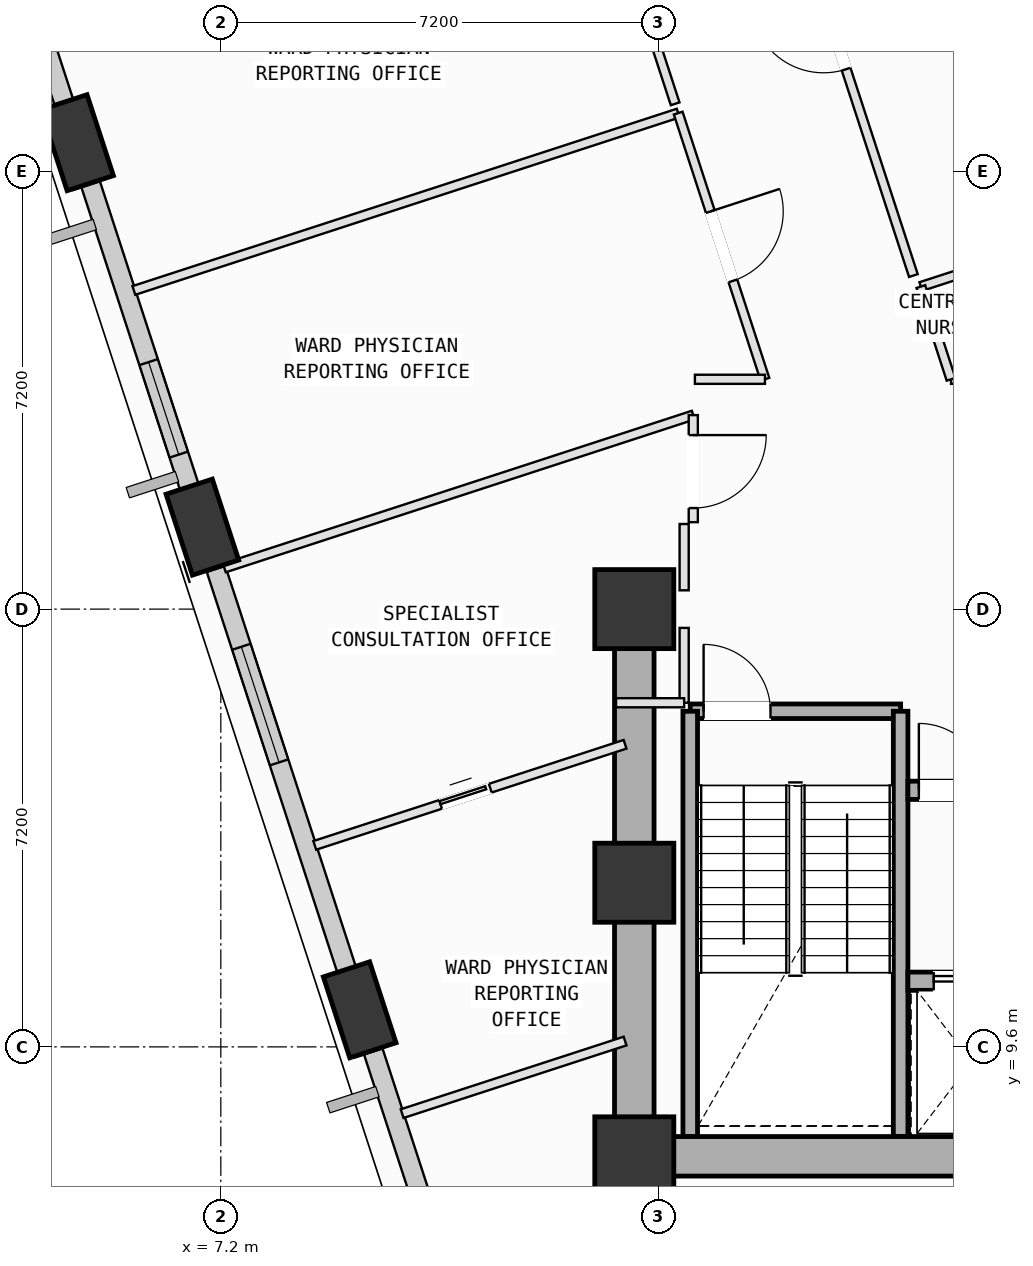
"""IFC4 building model, lengths in metres.
Left out: names, types, materials, properties, quantities, classifications, styles, units other than length and angle.
Written with IfcOpenShell. Run it as: python <this file> out.ifc"""

import sys

from ifc_helpers import new_model, si_unit, direction, frame, frame_2d, origin, origin_2d, place, context, subcontext, project, spatial, rectangle, extrude, element, fill, save


model = new_model("IFC4")
c1 = context("Model", 3, precision=1e-05, world=origin(), true_north=direction((0.0, 1.0)))
c2 = subcontext(c1, "Body", "Model", "MODEL_VIEW")
j1 = project(units=[si_unit("LENGTHUNIT", "METRE"), si_unit("PLANEANGLEUNIT", "RADIAN")], contexts=[c1])
p1 = place(None, origin())
s1 = spatial("IfcSite", under=j1, at=p1, CompositionType="ELEMENT")
p2 = place(p1, origin())
s2 = spatial("IfcBuilding", under=s1, at=p2, CompositionType="ELEMENT")
p3 = place(p2, frame((0.0, 0.0, 100.4)))
s3 = spatial("IfcBuildingStorey", under=s2, at=p3, CompositionType="ELEMENT", Elevation=100.4)
for number, where, z_axis, x_axis in (
    (1, (14.0, 7.8, 0.0), (0.0, 0.0, 1.0), (1.0, 0.0, 0.0)),
    (2, (14.0, 12.3, 0.0), (0.0, 0.0, 1.0), (1.0, 0.0, 0.0)),
    (3, (14.0, 16.8, 0.0), (0.0, 0.0, 1.0), (1.0, 0.0, 0.0)),
):
    element("IfcColumn", number, at=place(p3, frame(where, z_axis=z_axis, x_axis=x_axis)), inside=s3, PredefinedType="COLUMN", context=c2, shape_type="SweptSolid", body=[
        extrude(rectangle(XDim=1.3, YDim=1.3, at=origin_2d()), origin(), (0.0, 0.0, 1.0), 4.0),
    ])
p4 = place(p3, frame((4.836, 24.471, 0.002), z_axis=(0.002365800756, -0.118350699345, 0.992969040278), x_axis=(-0.328653525962, 0.937720451022, 0.112548725485)))
e4 = element("IfcColumn", 4, at=p4, inside=s3, PredefinedType="COLUMN", context=c2, shape_type="SweptSolid", body=[
    extrude(rectangle(XDim=1.4, YDim=0.8, at=origin_2d()), origin(), (0.0, 0.0, 1.0), 4.025),
])
p5 = place(p3, frame((6.897, 18.148, 0.002), z_axis=(0.028285043341, -0.109741112361, 0.993557670486), x_axis=(-0.535815583554, 0.837431497427, 0.107750394605)))
e5 = element("IfcColumn", 5, at=p5, inside=s3, PredefinedType="COLUMN", context=c2, shape_type="SweptSolid", body=[
    extrude(rectangle(XDim=1.4, YDim=0.8, at=origin_2d()), origin(), (0.0, 0.0, 1.0), 4.022),
])
p6 = place(p3, frame((9.484, 10.209, 0.002), z_axis=(0.060860512795, -0.098784561146, 0.993245995945), x_axis=(-0.75915259844, 0.641496218558, 0.110317423181)))
e6 = element("IfcColumn", 6, at=p6, inside=s3, PredefinedType="COLUMN", context=c2, shape_type="SweptSolid", body=[
    extrude(rectangle(XDim=1.4, YDim=0.8, at=origin_2d()), origin(), (0.0, 0.0, 1.0), 4.023),
])
p7 = place(p3, frame((4.755, 24.722, 0.0), z_axis=(0.0, 0.0, 1.0), x_axis=(-0.309830500862, 0.950791807251, 0.0)))
e7 = element("IfcWall", 7, at=p7, inside=s3, PredefinedType="SOLIDWALL", context=c2, shape_type="SweptSolid", body=[
    extrude(rectangle(XDim=5.628, YDim=0.32, at=frame_2d((2.814, 0.0))), origin(), (0.0, 0.0, 1.0), 3.165),
])
p8 = place(p7, frame((3.363, 0.0, 0.75)))
e8 = element("IfcOpeningElement", 8, at=p8, cuts=e7, PredefinedType="OPENING", context=c2, shape_type="SweptSolid", body=[
    extrude(rectangle(XDim=1.2, YDim=1.75, at=frame_2d((0.6, 0.875))), frame((0.0, 0.17, 0.0), z_axis=(0.0, -1.0, 0.0), x_axis=(1.0, 0.0, 0.0)), (0.0, 0.0, 1.0), 0.34),
])
p9 = place(p3, frame((6.814, 18.404, 0.0), z_axis=(0.0, 0.0, 1.0), x_axis=(-0.309882496641, 0.950774862034, 0.0)))
e9 = element("IfcWall", 9, at=p9, inside=s3, PredefinedType="SOLIDWALL", context=c2, shape_type="SweptSolid", body=[
    extrude(rectangle(XDim=5.662, YDim=0.32, at=frame_2d((2.831, 0.0))), origin(), (0.0, 0.0, 1.0), 3.165),
])
p10 = place(p9, frame((0.986, 0.0, 0.75)))
e10 = element("IfcOpeningElement", 10, at=p10, cuts=e9, PredefinedType="OPENING", context=c2, shape_type="SweptSolid", body=[
    extrude(rectangle(XDim=1.6, YDim=1.95, at=frame_2d((0.8, 0.975))), frame((0.0, 0.17, 0.0), z_axis=(0.0, -1.0, 0.0), x_axis=(1.0, 0.0, 0.0)), (0.0, 0.0, 1.0), 0.34),
])
p11 = place(p3, frame((9.402, 10.463, 0.0), z_axis=(0.0, 0.0, 1.0), x_axis=(-0.309842005691, 0.950788058144, 0.0)))
e11 = element("IfcWall", 11, at=p11, inside=s3, PredefinedType="SOLIDWALL", context=c2, shape_type="SweptSolid", body=[
    extrude(rectangle(XDim=7.36, YDim=0.32, at=frame_2d((3.68, 0.0))), origin(), (0.0, 0.0, 1.0), 3.165),
])
p12 = place(p11, frame((4.014, 0.0, 0.75)))
e12 = element("IfcOpeningElement", 12, at=p12, cuts=e11, PredefinedType="OPENING", context=c2, shape_type="SweptSolid", body=[
    extrude(rectangle(XDim=2.0, YDim=1.95, at=frame_2d((1.0, 0.975))), frame((0.0, 0.17, 0.0), z_axis=(0.0, -1.0, 0.0), x_axis=(1.0, 0.0, 0.0)), (0.0, 0.0, 1.0), 0.34),
])
p13 = place(p3, frame((11.635, 3.608, 0.0), z_axis=(0.0, 0.0, 1.0), x_axis=(-0.30986565919, 0.950780349637, 0.0)))
e13 = element("IfcWall", 13, at=p13, inside=s3, PredefinedType="SOLIDWALL", context=c2, shape_type="SweptSolid", body=[
    extrude(rectangle(XDim=6.224, YDim=0.32, at=frame_2d((3.112, 0.0))), origin(), (0.0, 0.0, 1.0), 3.165),
])
p14 = place(p13, frame((1.75, 0.0, 0.75)))
e14 = element("IfcOpeningElement", 14, at=p14, cuts=e13, PredefinedType="OPENING", context=c2, shape_type="SweptSolid", body=[
    extrude(rectangle(XDim=1.4, YDim=1.85, at=frame_2d((0.7, 0.925))), frame((0.0, 0.17, 0.0), z_axis=(0.0, -1.0, 0.0), x_axis=(1.0, 0.0, 0.0)), (0.0, 0.0, 1.0), 0.34),
])
p15 = place(p3, frame((14.92, 15.12, 0.0), z_axis=(0.0, 0.0, 1.0), x_axis=(1.0, 0.0, 0.0)))
e15 = element("IfcWall", 15, at=p15, inside=s3, PredefinedType="SOLIDWALL", context=c2, shape_type="SweptSolid", body=[
    extrude(rectangle(XDim=3.46, YDim=0.24, at=frame_2d((1.73, 0.0))), origin(), (0.0, 0.0, 1.0), 3.78),
])
p16 = place(p15, frame((0.22, 0.0, 0.0)))
e16 = element("IfcOpeningElement", 16, at=p16, cuts=e15, PredefinedType="OPENING", context=c2, shape_type="SweptSolid", body=[
    extrude(rectangle(XDim=1.1, YDim=2.15, at=frame_2d((0.55, 1.075))), frame((0.0, 0.13, 0.0), z_axis=(0.0, -1.0, 0.0), x_axis=(1.0, 0.0, 0.0)), (0.0, 0.0, 1.0), 0.26),
])
for number, where, z_axis, x_axis in (
    (17, (18.38, 15.12, 0.0), (0.0, 0.0, 1.0), (0.0, -1.0, 0.0)),
    (18, (14.92, 8.125, 0.0), (0.0, 0.0, 1.0), (0.0, 1.0, 0.0)),
):
    element("IfcWall", number, at=place(p3, frame(where, z_axis=z_axis, x_axis=x_axis)), inside=s3, PredefinedType="SOLIDWALL", context=c2, shape_type="SweptSolid", body=[
        extrude(rectangle(XDim=6.995, YDim=0.24, at=frame_2d((3.498, 0.0))), origin(), (0.0, 0.0, 1.0), 3.78),
    ])
p17 = place(p3, frame((14.0, 7.8, 0.0), z_axis=(0.0, 0.0, 1.0), x_axis=(1.0, 0.0, 0.0)))
e19 = element("IfcWall", 19, at=p17, inside=s3, PredefinedType="SHEAR", context=c2, shape_type="SweptSolid", body=[
    extrude(rectangle(XDim=10.8, YDim=0.65, at=frame_2d((5.4, 0.0))), origin(), (0.0, 0.0, 1.0), 3.78),
])
p18 = place(p3, frame((14.0, 16.8, 0.0), z_axis=(0.0, 0.0, 1.0), x_axis=(0.0, -1.0, 0.0)))
e20 = element("IfcWall", 20, at=p18, inside=s3, PredefinedType="SHEAR", context=c2, shape_type="SweptSolid", body=[
    extrude(rectangle(XDim=9.0, YDim=0.65, at=frame_2d((4.5, 0.0))), origin(), (0.0, 0.0, 1.0), 3.78),
])
p19 = place(p3, frame((18.5, 10.68, 0.0), z_axis=(0.0, 0.0, 1.0), x_axis=(1.0, 0.0, 0.0)))
e21 = element("IfcWall", 21, at=p19, inside=s3, PredefinedType="SOLIDWALL", context=c2, shape_type="SweptSolid", body=[
    extrude(rectangle(XDim=5.3, YDim=0.3, at=frame_2d((2.65, 0.0))), origin(), (0.0, 0.0, 1.0), 3.78),
])
p20 = place(p19, frame((4.22, 0.0, 0.0)))
e22 = element("IfcOpeningElement", 22, at=p20, cuts=e21, PredefinedType="OPENING", context=c2, shape_type="SweptSolid", body=[
    extrude(rectangle(XDim=0.86, YDim=2.06, at=frame_2d((0.43, 1.03))), frame((0.0, 0.16, 0.0), z_axis=(0.0, -1.0, 0.0), x_axis=(1.0, 0.0, 0.0)), (0.0, 0.0, 1.0), 0.32),
])
p21 = place(p19, frame((0.425, 0.0, 0.0)))
e23 = element("IfcOpeningElement", 23, at=p21, cuts=e21, PredefinedType="OPENING", context=c2, shape_type="SweptSolid", body=[
    extrude(rectangle(XDim=1.25, YDim=2.18, at=frame_2d((0.625, 1.09))), frame((0.0, 0.16, 0.0), z_axis=(0.0, -1.0, 0.0), x_axis=(1.0, 0.0, 0.0)), (0.0, 0.0, 1.0), 0.32),
])
p22 = place(p19, frame((2.525, 0.0, 0.0)))
e24 = element("IfcOpeningElement", 24, at=p22, cuts=e21, PredefinedType="OPENING", context=c2, shape_type="SweptSolid", body=[
    extrude(rectangle(XDim=1.25, YDim=2.18, at=frame_2d((0.625, 1.09))), frame((0.0, 0.16, 0.0), z_axis=(0.0, -1.0, 0.0), x_axis=(1.0, 0.0, 0.0)), (0.0, 0.0, 1.0), 0.32),
])
p23 = place(p3, frame((18.5, 13.82, 0.0), z_axis=(0.0, 0.0, 1.0), x_axis=(1.0, 0.0, 0.0)))
e25 = element("IfcWall", 25, at=p23, inside=s3, PredefinedType="SOLIDWALL", context=c2, shape_type="SweptSolid", body=[
    extrude(rectangle(XDim=5.3, YDim=0.3, at=frame_2d((2.65, 0.0))), origin(), (0.0, 0.0, 1.0), 3.78),
])
p24 = place(p23, frame((0.18, 0.0, 0.0)))
e26 = element("IfcOpeningElement", 26, at=p24, cuts=e25, PredefinedType="OPENING", context=c2, shape_type="SweptSolid", body=[
    extrude(rectangle(XDim=1.1, YDim=2.15, at=frame_2d((0.55, 1.075))), frame((0.0, 0.16, 0.0), z_axis=(0.0, -1.0, 0.0), x_axis=(1.0, 0.0, 0.0)), (0.0, 0.0, 1.0), 0.32),
])
p25 = place(p3, frame((9.488, 9.453, 0.0), z_axis=(0.0, 0.0, 1.0), x_axis=(-0.309091668066, 0.951032250101, 0.0)))
e27 = element("IfcWall", 27, at=p25, inside=s3, PredefinedType="PARTITIONING", context=c2, shape_type="SweptSolid", body=[
    extrude(rectangle(XDim=0.987, YDim=0.15, at=frame_2d((0.493, 0.0))), origin(), (0.0, 0.0, 1.0), 3.165),
])
p26 = place(p3, frame((8.745, 12.914, 0.0), z_axis=(0.0, 0.0, 1.0), x_axis=(0.950790740301, 0.309833775044, 0.0)))
e28 = element("IfcWall", 28, at=p26, inside=s3, PredefinedType="PARTITIONING", context=c2, shape_type="SweptSolid", body=[
    extrude(rectangle(XDim=5.367, YDim=0.15, at=frame_2d((2.684, 0.0))), origin(), (0.0, 0.0, 1.0), 3.78),
])
p27 = place(p26, frame((2.176, 0.0, 0.0)))
e29 = element("IfcOpeningElement", 29, at=p27, cuts=e28, PredefinedType="OPENING", context=c2, shape_type="SweptSolid", body=[
    extrude(rectangle(XDim=0.86, YDim=2.06, at=frame_2d((0.43, 1.03))), frame((0.0, 0.085, 0.0), z_axis=(0.0, -1.0, 0.0), x_axis=(1.0, 0.0, 0.0)), (0.0, 0.0, 1.0), 0.17),
])
p28 = place(p3, frame((13.848, 9.696, 0.0), z_axis=(0.0, 0.0, 1.0), x_axis=(-0.950832842999, -0.30970454416, 0.0)))
e30 = element("IfcWall", 30, at=p28, inside=s3, PredefinedType="PARTITIONING", context=c2, shape_type="SweptSolid", body=[
    extrude(rectangle(XDim=3.855, YDim=0.15, at=frame_2d((1.928, 0.0))), origin(), (0.0, 0.0, 1.0), 3.78),
])
p29 = place(p3, frame((14.82, 18.2, 0.0), z_axis=(0.0, 0.0, 1.0), x_axis=(0.0, -1.0, 0.0)))
e31 = element("IfcWall", 31, at=p29, inside=s3, PredefinedType="PARTITIONING", context=c2, shape_type="SweptSolid", body=[
    extrude(rectangle(XDim=1.091, YDim=0.15, at=frame_2d((0.545, 0.0))), origin(), (0.0, 0.0, 1.0), 3.78),
])
p30 = place(p3, frame((14.82, 16.491, 0.0), z_axis=(0.0, 0.0, 1.0), x_axis=(0.0, -1.0, 0.0)))
e32 = element("IfcWall", 32, at=p30, inside=s3, PredefinedType="PARTITIONING", context=c2, shape_type="SweptSolid", body=[
    extrude(rectangle(XDim=1.231, YDim=0.15, at=frame_2d((0.615, 0.0))), origin(), (0.0, 0.0, 1.0), 3.78),
])
p31 = place(p3, frame((14.82, 15.26, 0.0), z_axis=(0.0, 0.0, 1.0), x_axis=(-1.0, 0.0, 0.0)))
e33 = element("IfcWall", 33, at=p31, inside=s3, PredefinedType="PARTITIONING", context=c2, shape_type="SweptSolid", body=[
    extrude(rectangle(XDim=1.12, YDim=0.15, at=frame_2d((0.56, 0.0))), origin(), (0.0, 0.0, 1.0), 3.78),
])
p32 = place(p3, frame((7.258, 17.477, 0.0), z_axis=(0.0, 0.0, 1.0), x_axis=(0.95076030653, 0.309927151967, 0.0)))
e34 = element("IfcWall", 34, at=p32, inside=s3, PredefinedType="PARTITIONING", context=c2, shape_type="SweptSolid", body=[
    extrude(rectangle(XDim=8.111, YDim=0.15, at=frame_2d((4.056, 0.0))), origin(), (0.0, 0.0, 1.0), 3.78),
])
p33 = place(p3, frame((14.97, 19.991, 0.0), z_axis=(0.0, 0.0, 1.0), x_axis=(0.0, -1.0, 0.0)))
e35 = element("IfcWall", 35, at=p33, inside=s3, PredefinedType="PARTITIONING", context=c2, shape_type="SweptSolid", body=[
    extrude(rectangle(XDim=1.761, YDim=0.15, at=frame_2d((0.88, 0.0))), origin(), (0.0, 0.0, 1.0), 3.78),
])
p34 = place(p33, frame((0.329, 0.0, 0.0)))
e36 = element("IfcOpeningElement", 36, at=p34, cuts=e35, PredefinedType="OPENING", context=c2, shape_type="SweptSolid", body=[
    extrude(rectangle(XDim=1.2, YDim=2.15, at=frame_2d((0.6, 1.075))), frame((0.0, 0.085, 0.0), z_axis=(0.0, -1.0, 0.0), x_axis=(1.0, 0.0, 0.0)), (0.0, 0.0, 1.0), 0.17),
])
p35 = place(p3, frame((6.861, 17.517, 0.0), z_axis=(0.0, 0.0, 1.0), x_axis=(-0.310076497617, 0.950711610125, 0.0)))
e37 = element("IfcWall", 37, at=p35, inside=s3, PredefinedType="PARTITIONING", context=c2, shape_type="SweptSolid", body=[
    extrude(rectangle(XDim=0.858, YDim=0.15, at=frame_2d((0.429, 0.0))), origin(), (0.0, 0.0, 1.0), 3.165),
])
p36 = place(p3, frame((5.77, 22.041, 0.0), z_axis=(0.0, 0.0, 1.0), x_axis=(0.95079577972, 0.309818310091, 0.0)))
e38 = element("IfcWall", 38, at=p36, inside=s3, PredefinedType="PARTITIONING", context=c2, shape_type="SweptSolid", body=[
    extrude(rectangle(XDim=9.415, YDim=0.15, at=frame_2d((4.708, 0.0))), origin(), (0.0, 0.0, 1.0), 3.78),
])
p37 = place(p3, frame((14.722, 24.958, 0.0), z_axis=(0.0, 0.0, 1.0), x_axis=(0.309905994954, -0.950767202995, 0.0)))
e39 = element("IfcWall", 39, at=p37, inside=s3, PredefinedType="PARTITIONING", context=c2, shape_type="SweptSolid", body=[
    extrude(rectangle(XDim=4.605, YDim=0.15, at=frame_2d((2.302, 0.0))), origin(), (0.0, 0.0, 1.0), 3.78),
])
p38 = place(p37, frame((1.702, 0.0, 0.0)))
e40 = element("IfcOpeningElement", 40, at=p38, cuts=e39, PredefinedType="OPENING", context=c2, shape_type="SweptSolid", body=[
    extrude(rectangle(XDim=1.2, YDim=2.15, at=frame_2d((0.6, 1.075))), frame((0.0, 0.085, 0.0), z_axis=(0.0, -1.0, 0.0), x_axis=(1.0, 0.0, 0.0)), (0.0, 0.0, 1.0), 0.17),
])
p39 = place(p3, frame((16.149, 20.58, 0.0), z_axis=(0.0, 0.0, 1.0), x_axis=(-1.0, 0.0, 0.0)))
e41 = element("IfcWall", 41, at=p39, inside=s3, PredefinedType="PARTITIONING", context=c2, shape_type="SweptSolid", body=[
    extrude(rectangle(XDim=1.152, YDim=0.15, at=frame_2d((0.576, 0.0))), origin(), (0.0, 0.0, 1.0), 3.78),
])
p40 = place(p3, frame((13.235, 29.522, 0.0), z_axis=(0.0, 0.0, 1.0), x_axis=(0.309763095605, -0.950813769674, 0.0)))
e42 = element("IfcWall", 42, at=p40, inside=s3, PredefinedType="PARTITIONING", context=c2, shape_type="SweptSolid", body=[
    extrude(rectangle(XDim=4.639, YDim=0.15, at=frame_2d((2.32, 0.0))), origin(), (0.0, 0.0, 1.0), 3.78),
])
p41 = place(p40, frame((1.719, 0.0, 0.0)))
e43 = element("IfcOpeningElement", 43, at=p41, cuts=e42, PredefinedType="OPENING", context=c2, shape_type="SweptSolid", body=[
    extrude(rectangle(XDim=1.2, YDim=2.15, at=frame_2d((0.6, 1.075))), frame((0.0, 0.085, 0.0), z_axis=(0.0, -1.0, 0.0), x_axis=(1.0, 0.0, 0.0)), (0.0, 0.0, 1.0), 0.17),
])
p42 = place(p3, frame((4.841, 23.716, 0.0), z_axis=(0.0, 0.0, 1.0), x_axis=(-0.310630917066, 0.950530606221, 0.0)))
e44 = element("IfcWall", 44, at=p42, inside=s3, PredefinedType="PARTITIONING", context=c2, shape_type="SweptSolid", body=[
    extrude(rectangle(XDim=0.982, YDim=0.15, at=frame_2d((0.491, 0.0))), origin(), (0.0, 0.0, 1.0), 3.165),
])
p43 = place(p3, frame((18.713, 22.105, 0.0), z_axis=(0.0, 0.0, 1.0), x_axis=(0.950798675911, 0.309809421879, 0.0)))
e45 = element("IfcWall", 45, at=p43, inside=s3, PredefinedType="PARTITIONING", context=c2, shape_type="SweptSolid", body=[
    extrude(rectangle(XDim=5.952, YDim=0.15, at=frame_2d((2.976, 0.0))), origin(), (0.0, 0.0, 1.0), 3.78),
])
p44 = place(p3, frame((25.469, 20.58, 0.0), z_axis=(0.0, 0.0, 1.0), x_axis=(-1.0, 0.0, 0.0)))
e46 = element("IfcWall", 46, at=p44, inside=s3, PredefinedType="PARTITIONING", context=c2, shape_type="SweptSolid", body=[
    extrude(rectangle(XDim=6.26, YDim=0.15, at=frame_2d((3.13, 0.0))), origin(), (0.0, 0.0, 1.0), 3.78),
])
p45 = place(p44, frame((2.63, 0.0, 0.0)))
e47 = element("IfcOpeningElement", 47, at=p45, cuts=e46, PredefinedType="OPENING", context=c2, shape_type="SweptSolid", body=[
    extrude(rectangle(XDim=1.0, YDim=2.12, at=frame_2d((0.5, 1.06))), frame((0.0, 0.085, 0.0), z_axis=(0.0, -1.0, 0.0), x_axis=(1.0, 0.0, 0.0)), (0.0, 0.0, 1.0), 0.17),
])
p46 = place(p3, frame((19.209, 20.58, 0.0), z_axis=(0.0, 0.0, 1.0), x_axis=(-0.309368350473, 0.950942282016, 0.0)))
e48 = element("IfcWall", 48, at=p46, inside=s3, PredefinedType="PARTITIONING", context=c2, shape_type="SweptSolid", body=[
    extrude(rectangle(XDim=1.604, YDim=0.15, at=frame_2d((0.802, 0.0))), origin(), (0.0, 0.0, 1.0), 3.78),
])
p47 = place(p3, frame((18.59, 22.286, 0.0), z_axis=(0.0, 0.0, 1.0), x_axis=(-0.30984457051, 0.950787222319, 0.0)))
e49 = element("IfcWall", 49, at=p47, inside=s3, PredefinedType="PARTITIONING", context=c2, shape_type="SweptSolid", body=[
    extrude(rectangle(XDim=8.34, YDim=0.15, at=frame_2d((4.17, 0.0))), origin(), (0.0, 0.0, 1.0), 3.78),
])
p48 = place(p47, frame((3.57, 0.0, 0.0)))
e50 = element("IfcOpeningElement", 50, at=p48, cuts=e49, PredefinedType="OPENING", context=c2, shape_type="SweptSolid", body=[
    extrude(rectangle(XDim=1.2, YDim=2.15, at=frame_2d((0.6, 1.075))), frame((0.0, 0.085, 0.0), z_axis=(0.0, -1.0, 0.0), x_axis=(1.0, 0.0, 0.0)), (0.0, 0.0, 1.0), 0.17),
])
p49 = place(p10, origin())
e51 = element("IfcWindow", 51, at=p49, inside=s3, PartitioningType="SINGLE_PANEL", PredefinedType="WINDOW", context=c2, shape_type="SweptSolid", body=[
    extrude(rectangle(XDim=1.6, YDim=1.95, at=frame_2d((0.8, 0.975))), frame((0.0, 0.03, 0.0), z_axis=(0.0, -1.0, 0.0), x_axis=(1.0, 0.0, 0.0)), (0.0, 0.0, 1.0), 0.06),
])
fill(e10, e51)
p50 = place(p12, origin())
e52 = element("IfcWindow", 52, at=p50, inside=s3, PartitioningType="SINGLE_PANEL", PredefinedType="WINDOW", context=c2, shape_type="SweptSolid", body=[
    extrude(rectangle(XDim=2.0, YDim=1.95, at=frame_2d((1.0, 0.975))), frame((0.0, 0.03, 0.0), z_axis=(0.0, -1.0, 0.0), x_axis=(1.0, 0.0, 0.0)), (0.0, 0.0, 1.0), 0.06),
])
fill(e12, e52)
p51 = place(p16, origin())
e53 = element("IfcDoor", 53, at=p51, inside=s3, OperationType="SINGLE_SWING_LEFT", PredefinedType="DOOR", context=c2, shape_type="SweptSolid", body=[
    extrude(rectangle(XDim=1.1, YDim=2.15, at=frame_2d((0.55, 1.075))), frame((0.0, 0.025, 0.0), z_axis=(0.0, -1.0, 0.0), x_axis=(1.0, 0.0, 0.0)), (0.0, 0.0, 1.0), 0.05),
])
fill(e16, e53)
p52 = place(p24, origin())
e54 = element("IfcDoor", 54, at=p52, inside=s3, OperationType="SINGLE_SWING_LEFT", PredefinedType="DOOR", context=c2, shape_type="SweptSolid", body=[
    extrude(rectangle(XDim=1.1, YDim=2.15, at=frame_2d((0.55, 1.075))), frame((0.0, 0.025, 0.0), z_axis=(0.0, -1.0, 0.0), x_axis=(1.0, 0.0, 0.0)), (0.0, 0.0, 1.0), 0.05),
])
fill(e26, e54)
p53 = place(p21, origin())
e55 = element("IfcDoor", 55, at=p53, inside=s3, OperationType="DOUBLE_DOOR_SLIDING", PredefinedType="DOOR", context=c2, shape_type="SweptSolid", body=[
    extrude(rectangle(XDim=1.25, YDim=2.18, at=frame_2d((0.625, 1.09))), frame((0.0, 0.025, 0.0), z_axis=(0.0, -1.0, 0.0), x_axis=(1.0, 0.0, 0.0)), (0.0, 0.0, 1.0), 0.05),
])
fill(e23, e55)
p54 = place(p34, origin())
e56 = element("IfcDoor", 56, at=p54, inside=s3, OperationType="SINGLE_SWING_LEFT", PredefinedType="DOOR", context=c2, shape_type="SweptSolid", body=[
    extrude(rectangle(XDim=1.2, YDim=2.15, at=frame_2d((0.6, 1.075))), frame((0.0, 0.025, 0.0), z_axis=(0.0, -1.0, 0.0), x_axis=(1.0, 0.0, 0.0)), (0.0, 0.0, 1.0), 0.05),
])
fill(e36, e56)
p55 = place(p38, origin())
e57 = element("IfcDoor", 57, at=p55, inside=s3, OperationType="SINGLE_SWING_LEFT", PredefinedType="DOOR", context=c2, shape_type="SweptSolid", body=[
    extrude(rectangle(XDim=1.2, YDim=2.15, at=frame_2d((0.6, 1.075))), frame((0.0, 0.025, 0.0), z_axis=(0.0, -1.0, 0.0), x_axis=(1.0, 0.0, 0.0)), (0.0, 0.0, 1.0), 0.05),
])
fill(e40, e57)
p56 = place(p48, origin())
e58 = element("IfcDoor", 58, at=p56, inside=s3, OperationType="SINGLE_SWING_RIGHT", PredefinedType="DOOR", context=c2, shape_type="SweptSolid", body=[
    extrude(rectangle(XDim=1.2, YDim=2.15, at=frame_2d((0.6, 1.075))), frame((0.0, 0.025, 0.0), z_axis=(0.0, -1.0, 0.0), x_axis=(1.0, 0.0, 0.0)), (0.0, 0.0, 1.0), 0.05),
])
fill(e50, e58)
p57 = place(p27, origin())
e59 = element("IfcDoor", 59, at=p57, inside=s3, OperationType="SLIDING_TO_LEFT", PredefinedType="DOOR", context=c2, shape_type="SweptSolid", body=[
    extrude(rectangle(XDim=0.86, YDim=2.06, at=frame_2d((0.43, 1.03))), frame((0.0, 0.025, 0.0), z_axis=(0.0, -1.0, 0.0), x_axis=(1.0, 0.0, 0.0)), (0.0, 0.0, 1.0), 0.05),
])
fill(e29, e59)
save(model, sys.argv[1])
